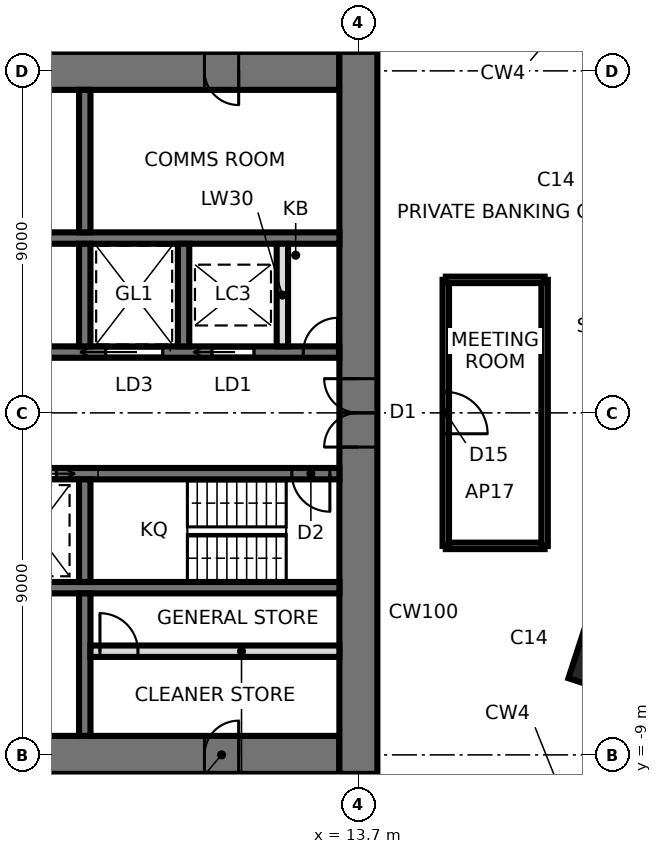
"""IFC4 building model, lengths in metres.
Left out: names, types, materials, properties, quantities, classifications, styles, units other than length and angle.
Written with IfcOpenShell. Run it as: python <this file> out.ifc"""

import sys

from ifc_helpers import new_model, si_unit, direction, frame, frame_2d, origin, origin_2d, place, context, subcontext, project, spatial, rectangle, extrude, element, fill, save


model = new_model("IFC4")
c1 = context("Model", 3, precision=1e-05, world=origin(), true_north=direction((0.0, 1.0)))
c2 = subcontext(c1, "Body", "Model", "MODEL_VIEW")
j1 = project(units=[si_unit("LENGTHUNIT", "METRE"), si_unit("PLANEANGLEUNIT", "RADIAN")], contexts=[c1])
p1 = place(None, origin())
s1 = spatial("IfcSite", under=j1, at=p1, CompositionType="ELEMENT")
p2 = place(p1, origin())
s2 = spatial("IfcBuilding", under=s1, at=p2, CompositionType="ELEMENT")
p3 = place(p2, frame((0.0, 0.0, 187.7)))
s3 = spatial("IfcBuildingStorey", under=s2, at=p3, CompositionType="ELEMENT", Elevation=187.7)
p4 = place(p3, frame((20.109, -6.534, 0.0), z_axis=(0.0, 0.0, 1.0), x_axis=(0.951056516295, -0.309016994375, 0.0)))
e1 = element("IfcColumn", 1, at=p4, inside=s3, PredefinedType="COLUMN", context=c2, shape_type="SweptSolid", body=[
    extrude(rectangle(XDim=1.4, YDim=1.4, at=origin_2d()), origin(), (0.0, 0.0, 1.0), 3.9),
])
p5 = place(p3, frame((-13.2, -9.0, 0.0), z_axis=(0.0, 0.0, 1.0), x_axis=(1.0, 0.0, 0.0)))
e2 = element("IfcWall", 2, at=p5, inside=s3, PredefinedType="SHEAR", context=c2, shape_type="SweptSolid", body=[
    extrude(rectangle(XDim=26.4, YDim=1.0, at=frame_2d((13.2, 0.0))), origin(), (0.0, 0.0, 1.0), 3.9),
])
p6 = place(p5, frame((2.65, 0.0, 0.0)))
e3 = element("IfcOpeningElement", 3, at=p6, cuts=e2, PredefinedType="OPENING", context=c2, shape_type="SweptSolid", body=[
    extrude(rectangle(XDim=0.9, YDim=2.1, at=frame_2d((0.45, 1.05))), frame((0.0, 0.51, 0.0), z_axis=(0.0, -1.0, 0.0), x_axis=(1.0, 0.0, 0.0)), (0.0, 0.0, 1.0), 1.02),
])
p7 = place(p5, frame((9.5, 0.0, 0.0)))
e4 = element("IfcOpeningElement", 4, at=p7, cuts=e2, PredefinedType="OPENING", context=c2, shape_type="SweptSolid", body=[
    extrude(rectangle(XDim=0.9, YDim=2.1, at=frame_2d((0.45, 1.05))), frame((0.0, 0.51, 0.0), z_axis=(0.0, -1.0, 0.0), x_axis=(1.0, 0.0, 0.0)), (0.0, 0.0, 1.0), 1.02),
])
p8 = place(p5, frame((16.0, 0.0, 0.0)))
e5 = element("IfcOpeningElement", 5, at=p8, cuts=e2, PredefinedType="OPENING", context=c2, shape_type="SweptSolid", body=[
    extrude(rectangle(XDim=0.9, YDim=2.1, at=frame_2d((0.45, 1.05))), frame((0.0, 0.51, 0.0), z_axis=(0.0, -1.0, 0.0), x_axis=(1.0, 0.0, 0.0)), (0.0, 0.0, 1.0), 1.02),
])
p9 = place(p5, frame((22.85, 0.0, 0.0)))
e6 = element("IfcOpeningElement", 6, at=p9, cuts=e2, PredefinedType="OPENING", context=c2, shape_type="SweptSolid", body=[
    extrude(rectangle(XDim=0.9, YDim=2.1, at=frame_2d((0.45, 1.05))), frame((0.0, 0.51, 0.0), z_axis=(0.0, -1.0, 0.0), x_axis=(1.0, 0.0, 0.0)), (0.0, 0.0, 1.0), 1.02),
])
p10 = place(p3, frame((13.2, 9.0, 0.0), z_axis=(0.0, 0.0, 1.0), x_axis=(-1.0, 0.0, 0.0)))
e7 = element("IfcWall", 7, at=p10, inside=s3, PredefinedType="SHEAR", context=c2, shape_type="SweptSolid", body=[
    extrude(rectangle(XDim=26.4, YDim=1.0, at=frame_2d((13.2, 0.0))), origin(), (0.0, 0.0, 1.0), 3.9),
])
p11 = place(p10, frame((2.65, 0.0, 0.0)))
e8 = element("IfcOpeningElement", 8, at=p11, cuts=e7, PredefinedType="OPENING", context=c2, shape_type="SweptSolid", body=[
    extrude(rectangle(XDim=0.9, YDim=2.1, at=frame_2d((0.45, 1.05))), frame((0.0, 0.51, 0.0), z_axis=(0.0, -1.0, 0.0), x_axis=(1.0, 0.0, 0.0)), (0.0, 0.0, 1.0), 1.02),
])
p12 = place(p10, frame((9.5, 0.0, 0.0)))
e9 = element("IfcOpeningElement", 9, at=p12, cuts=e7, PredefinedType="OPENING", context=c2, shape_type="SweptSolid", body=[
    extrude(rectangle(XDim=0.9, YDim=2.1, at=frame_2d((0.45, 1.05))), frame((0.0, 0.51, 0.0), z_axis=(0.0, -1.0, 0.0), x_axis=(1.0, 0.0, 0.0)), (0.0, 0.0, 1.0), 1.02),
])
p13 = place(p10, frame((16.0, 0.0, 0.0)))
e10 = element("IfcOpeningElement", 10, at=p13, cuts=e7, PredefinedType="OPENING", context=c2, shape_type="SweptSolid", body=[
    extrude(rectangle(XDim=0.9, YDim=2.1, at=frame_2d((0.45, 1.05))), frame((0.0, 0.51, 0.0), z_axis=(0.0, -1.0, 0.0), x_axis=(1.0, 0.0, 0.0)), (0.0, 0.0, 1.0), 1.02),
])
p14 = place(p10, frame((21.25, 0.0, 0.0)))
e11 = element("IfcOpeningElement", 11, at=p14, cuts=e7, PredefinedType="OPENING", context=c2, shape_type="SweptSolid", body=[
    extrude(rectangle(XDim=0.9, YDim=2.1, at=frame_2d((0.45, 1.05))), frame((0.0, 0.51, 0.0), z_axis=(0.0, -1.0, 0.0), x_axis=(1.0, 0.0, 0.0)), (0.0, 0.0, 1.0), 1.02),
])
p15 = place(p10, frame((24.8, 0.0, 0.0)))
e12 = element("IfcOpeningElement", 12, at=p15, cuts=e7, PredefinedType="OPENING", context=c2, shape_type="SweptSolid", body=[
    extrude(rectangle(XDim=1.0, YDim=2.1, at=frame_2d((0.5, 1.05))), frame((0.0, 0.51, 0.0), z_axis=(0.0, -1.0, 0.0), x_axis=(1.0, 0.0, 0.0)), (0.0, 0.0, 1.0), 1.02),
])
p16 = place(p3, frame((13.7, -9.5, 0.0), z_axis=(0.0, 0.0, 1.0), x_axis=(0.0, 1.0, 0.0)))
e13 = element("IfcWall", 13, at=p16, inside=s3, PredefinedType="SHEAR", context=c2, shape_type="SweptSolid", body=[
    extrude(rectangle(XDim=19.0, YDim=1.0, at=frame_2d((9.5, 0.0))), origin(), (0.0, 0.0, 1.0), 3.9),
])
p17 = place(p16, frame((8.6, 0.0, 0.0)))
e14 = element("IfcOpeningElement", 14, at=p17, cuts=e13, PredefinedType="OPENING", context=c2, shape_type="SweptSolid", body=[
    extrude(rectangle(XDim=1.8, YDim=2.4, at=frame_2d((0.9, 1.2))), frame((0.0, 0.51, 0.0), z_axis=(0.0, -1.0, 0.0), x_axis=(1.0, 0.0, 0.0)), (0.0, 0.0, 1.0), 1.02),
])
p18 = place(p3, frame((-13.2, 1.6, 0.0), z_axis=(0.0, 0.0, 1.0), x_axis=(1.0, 0.0, 0.0)))
e15 = element("IfcWall", 15, at=p18, inside=s3, PredefinedType="SHEAR", context=c2, shape_type="SweptSolid", body=[
    extrude(rectangle(XDim=26.4, YDim=0.3, at=frame_2d((13.2, 0.0))), origin(), (0.0, 0.0, 1.0), 3.9),
])
p19 = place(p18, frame((0.25, 0.0, 0.0)))
e16 = element("IfcOpeningElement", 16, at=p19, cuts=e15, PredefinedType="OPENING", context=c2, shape_type="SweptSolid", body=[
    extrude(rectangle(XDim=1.0, YDim=2.1, at=frame_2d((0.5, 1.05))), frame((0.0, 0.16, 0.0), z_axis=(0.0, -1.0, 0.0), x_axis=(1.0, 0.0, 0.0)), (0.0, 0.0, 1.0), 0.32),
])
p20 = place(p18, frame((23.05, 0.0, 0.0)))
e17 = element("IfcOpeningElement", 17, at=p20, cuts=e15, PredefinedType="OPENING", context=c2, shape_type="SweptSolid", body=[
    extrude(rectangle(XDim=1.1, YDim=2.3, at=frame_2d((0.55, 1.15))), frame((0.0, 0.16, 0.0), z_axis=(0.0, -1.0, 0.0), x_axis=(1.0, 0.0, 0.0)), (0.0, 0.0, 1.0), 0.32),
])
p21 = place(p18, frame((20.25, 0.0, 0.0)))
e18 = element("IfcOpeningElement", 18, at=p21, cuts=e15, PredefinedType="OPENING", context=c2, shape_type="SweptSolid", body=[
    extrude(rectangle(XDim=1.5, YDim=2.4, at=frame_2d((0.75, 1.2))), frame((0.0, 0.16, 0.0), z_axis=(0.0, -1.0, 0.0), x_axis=(1.0, 0.0, 0.0)), (0.0, 0.0, 1.0), 0.32),
])
p22 = place(p18, frame((6.95, 0.0, 0.0)))
e19 = element("IfcOpeningElement", 19, at=p22, cuts=e15, PredefinedType="OPENING", context=c2, shape_type="SweptSolid", body=[
    extrude(rectangle(XDim=0.9, YDim=2.1, at=frame_2d((0.45, 1.05))), frame((0.0, 0.16, 0.0), z_axis=(0.0, -1.0, 0.0), x_axis=(1.0, 0.0, 0.0)), (0.0, 0.0, 1.0), 0.32),
])
p23 = place(p18, frame((9.55, 0.0, 0.0)))
e20 = element("IfcOpeningElement", 20, at=p23, cuts=e15, PredefinedType="OPENING", context=c2, shape_type="SweptSolid", body=[
    extrude(rectangle(XDim=0.9, YDim=2.1, at=frame_2d((0.45, 1.05))), frame((0.0, 0.16, 0.0), z_axis=(0.0, -1.0, 0.0), x_axis=(1.0, 0.0, 0.0)), (0.0, 0.0, 1.0), 0.32),
])
p24 = place(p18, frame((12.15, 0.0, 0.0)))
e21 = element("IfcOpeningElement", 21, at=p24, cuts=e15, PredefinedType="OPENING", context=c2, shape_type="SweptSolid", body=[
    extrude(rectangle(XDim=0.9, YDim=2.1, at=frame_2d((0.45, 1.05))), frame((0.0, 0.16, 0.0), z_axis=(0.0, -1.0, 0.0), x_axis=(1.0, 0.0, 0.0)), (0.0, 0.0, 1.0), 0.32),
])
p25 = place(p18, frame((25.45, 0.0, 0.0)))
e22 = element("IfcOpeningElement", 22, at=p25, cuts=e15, PredefinedType="OPENING", context=c2, shape_type="SweptSolid", body=[
    extrude(rectangle(XDim=0.9, YDim=2.1, at=frame_2d((0.45, 1.05))), frame((0.0, 0.16, 0.0), z_axis=(0.0, -1.0, 0.0), x_axis=(1.0, 0.0, 0.0)), (0.0, 0.0, 1.0), 0.32),
])
p26 = place(p3, frame((-13.2, -1.6, 0.0), z_axis=(0.0, 0.0, 1.0), x_axis=(1.0, 0.0, 0.0)))
e23 = element("IfcWall", 23, at=p26, inside=s3, PredefinedType="SHEAR", context=c2, shape_type="SweptSolid", body=[
    extrude(rectangle(XDim=26.4, YDim=0.3, at=frame_2d((13.2, 0.0))), origin(), (0.0, 0.0, 1.0), 3.9),
])
p27 = place(p26, frame((25.15, 0.0, 0.0)))
e24 = element("IfcOpeningElement", 24, at=p27, cuts=e23, PredefinedType="OPENING", context=c2, shape_type="SweptSolid", body=[
    extrude(rectangle(XDim=1.0, YDim=2.1, at=frame_2d((0.5, 1.05))), frame((0.0, 0.16, 0.0), z_axis=(0.0, -1.0, 0.0), x_axis=(1.0, 0.0, 0.0)), (0.0, 0.0, 1.0), 0.32),
])
p28 = place(p26, frame((7.55, 0.0, 0.0)))
e25 = element("IfcOpeningElement", 25, at=p28, cuts=e23, PredefinedType="OPENING", context=c2, shape_type="SweptSolid", body=[
    extrude(rectangle(XDim=0.9, YDim=2.1, at=frame_2d((0.45, 1.05))), frame((0.0, 0.16, 0.0), z_axis=(0.0, -1.0, 0.0), x_axis=(1.0, 0.0, 0.0)), (0.0, 0.0, 1.0), 0.32),
])
p29 = place(p26, frame((9.55, 0.0, 0.0)))
e26 = element("IfcOpeningElement", 26, at=p29, cuts=e23, PredefinedType="OPENING", context=c2, shape_type="SweptSolid", body=[
    extrude(rectangle(XDim=0.9, YDim=2.1, at=frame_2d((0.45, 1.05))), frame((0.0, 0.16, 0.0), z_axis=(0.0, -1.0, 0.0), x_axis=(1.0, 0.0, 0.0)), (0.0, 0.0, 1.0), 0.32),
])
p30 = place(p26, frame((12.15, 0.0, 0.0)))
e27 = element("IfcOpeningElement", 27, at=p30, cuts=e23, PredefinedType="OPENING", context=c2, shape_type="SweptSolid", body=[
    extrude(rectangle(XDim=0.9, YDim=2.1, at=frame_2d((0.45, 1.05))), frame((0.0, 0.16, 0.0), z_axis=(0.0, -1.0, 0.0), x_axis=(1.0, 0.0, 0.0)), (0.0, 0.0, 1.0), 0.32),
])
p31 = place(p26, frame((15.25, 0.0, 0.0)))
e28 = element("IfcOpeningElement", 28, at=p31, cuts=e23, PredefinedType="OPENING", context=c2, shape_type="SweptSolid", body=[
    extrude(rectangle(XDim=1.1, YDim=2.3, at=frame_2d((0.55, 1.15))), frame((0.0, 0.16, 0.0), z_axis=(0.0, -1.0, 0.0), x_axis=(1.0, 0.0, 0.0)), (0.0, 0.0, 1.0), 0.32),
])
p32 = place(p26, frame((17.85, 0.0, 0.0)))
e29 = element("IfcOpeningElement", 29, at=p32, cuts=e23, PredefinedType="OPENING", context=c2, shape_type="SweptSolid", body=[
    extrude(rectangle(XDim=1.1, YDim=2.3, at=frame_2d((0.55, 1.15))), frame((0.0, 0.16, 0.0), z_axis=(0.0, -1.0, 0.0), x_axis=(1.0, 0.0, 0.0)), (0.0, 0.0, 1.0), 0.32),
])
p33 = place(p26, frame((4.85, 0.0, 0.0)))
e30 = element("IfcOpeningElement", 30, at=p33, cuts=e23, PredefinedType="OPENING", context=c2, shape_type="SweptSolid", body=[
    extrude(rectangle(XDim=1.1, YDim=2.3, at=frame_2d((0.55, 1.15))), frame((0.0, 0.16, 0.0), z_axis=(0.0, -1.0, 0.0), x_axis=(1.0, 0.0, 0.0)), (0.0, 0.0, 1.0), 0.32),
])
p34 = place(p26, frame((2.25, 0.0, 0.0)))
e31 = element("IfcOpeningElement", 31, at=p34, cuts=e23, PredefinedType="OPENING", context=c2, shape_type="SweptSolid", body=[
    extrude(rectangle(XDim=1.1, YDim=2.3, at=frame_2d((0.55, 1.15))), frame((0.0, 0.16, 0.0), z_axis=(0.0, -1.0, 0.0), x_axis=(1.0, 0.0, 0.0)), (0.0, 0.0, 1.0), 0.32),
])
p35 = place(p26, frame((0.35, 0.0, 0.0)))
e32 = element("IfcOpeningElement", 32, at=p35, cuts=e23, PredefinedType="OPENING", context=c2, shape_type="SweptSolid", body=[
    extrude(rectangle(XDim=0.9, YDim=2.1, at=frame_2d((0.45, 1.05))), frame((0.0, 0.16, 0.0), z_axis=(0.0, -1.0, 0.0), x_axis=(1.0, 0.0, 0.0)), (0.0, 0.0, 1.0), 0.32),
])
for number, where, z_axis, x_axis in (
    (33, (-13.2, 4.6, 0.0), (0.0, 0.0, 1.0), (1.0, 0.0, 0.0)),
    (34, (-13.2, -4.6, 0.0), (0.0, 0.0, 1.0), (1.0, 0.0, 0.0)),
):
    element("IfcWall", number, at=place(p3, frame(where, z_axis=z_axis, x_axis=x_axis)), inside=s3, PredefinedType="SHEAR", context=c2, shape_type="SweptSolid", body=[
        extrude(rectangle(XDim=26.4, YDim=0.3, at=frame_2d((13.2, 0.0))), origin(), (0.0, 0.0, 1.0), 3.9),
    ])
p36 = place(p3, frame((6.5, 1.75, 0.0), z_axis=(0.0, 0.0, 1.0), x_axis=(0.0, 1.0, 0.0)))
e35 = element("IfcWall", 35, at=p36, inside=s3, PredefinedType="SHEAR", context=c2, shape_type="SweptSolid", body=[
    extrude(rectangle(XDim=2.7, YDim=0.3, at=frame_2d((1.35, 0.0))), origin(), (0.0, 0.0, 1.0), 3.9),
])
p37 = place(p3, frame((6.5, 4.75, 0.0), z_axis=(0.0, 0.0, 1.0), x_axis=(0.0, 1.0, 0.0)))
e36 = element("IfcWall", 36, at=p37, inside=s3, PredefinedType="SHEAR", context=c2, shape_type="SweptSolid", body=[
    extrude(rectangle(XDim=3.75, YDim=0.3, at=frame_2d((1.875, 0.0))), origin(), (0.0, 0.0, 1.0), 3.9),
])
p38 = place(p3, frame((6.5, -1.75, 0.0), z_axis=(0.0, 0.0, 1.0), x_axis=(0.0, -1.0, 0.0)))
e37 = element("IfcWall", 37, at=p38, inside=s3, PredefinedType="SHEAR", context=c2, shape_type="SweptSolid", body=[
    extrude(rectangle(XDim=2.7, YDim=0.3, at=frame_2d((1.35, 0.0))), origin(), (0.0, 0.0, 1.0), 3.9),
])
p39 = place(p3, frame((6.5, -4.75, 0.0), z_axis=(0.0, 0.0, 1.0), x_axis=(0.0, -1.0, 0.0)))
e38 = element("IfcWall", 38, at=p39, inside=s3, PredefinedType="SHEAR", context=c2, shape_type="SweptSolid", body=[
    extrude(rectangle(XDim=3.75, YDim=0.3, at=frame_2d((1.875, 0.0))), origin(), (0.0, 0.0, 1.0), 3.9),
])
p40 = place(p3, frame((9.1, 1.75, 0.0), z_axis=(0.0, 0.0, 1.0), x_axis=(0.0, 1.0, 0.0)))
e39 = element("IfcWall", 39, at=p40, inside=s3, PredefinedType="SHEAR", context=c2, shape_type="SweptSolid", body=[
    extrude(rectangle(XDim=2.7, YDim=0.3, at=frame_2d((1.35, 0.0))), origin(), (0.0, 0.0, 1.0), 3.9),
])
p41 = place(p3, frame((6.65, -6.272, 0.0), z_axis=(0.0, 0.0, 1.0), x_axis=(1.0, 0.0, 0.0)))
e40 = element("IfcWall", 40, at=p41, inside=s3, PredefinedType="PARTITIONING", context=c2, shape_type="SweptSolid", body=[
    extrude(rectangle(XDim=6.55, YDim=0.3, at=frame_2d((3.275, 0.0))), origin(), (0.0, 0.0, 1.0), 3.74),
])
p42 = place(p41, frame((0.25, 0.0, 0.0)))
e41 = element("IfcOpeningElement", 41, at=p42, cuts=e40, PredefinedType="OPENING", context=c2, shape_type="SweptSolid", body=[
    extrude(rectangle(XDim=1.0, YDim=2.4, at=frame_2d((0.5, 1.2))), frame((0.0, 0.16, 0.0), z_axis=(0.0, -1.0, 0.0), x_axis=(1.0, 0.0, 0.0)), (0.0, 0.0, 1.0), 0.32),
])
p43 = place(p3, frame((11.7, 1.75, 0.0), z_axis=(0.0, 0.0, 1.0), x_axis=(0.0, 1.0, 0.0)))
e42 = element("IfcWall", 42, at=p43, inside=s3, PredefinedType="SOLIDWALL", context=c2, shape_type="SweptSolid", body=[
    extrude(rectangle(XDim=2.7, YDim=0.3, at=frame_2d((1.35, 0.0))), origin(), (0.0, 0.0, 1.0), 3.74),
])
p44 = place(p3, frame((18.6, -3.5, 0.0), z_axis=(0.0, 0.0, 1.0), x_axis=(-1.0, 0.0, 0.0)))
e43 = element("IfcWall", 43, at=p44, inside=s3, PredefinedType="PARTITIONING", context=c2, shape_type="SweptSolid", body=[
    extrude(rectangle(XDim=2.6, YDim=0.17, at=frame_2d((1.3, 0.0))), origin(), (0.0, 0.0, 1.0), 3.74),
])
p45 = place(p3, frame((16.0, -3.5, 0.0), z_axis=(0.0, 0.0, 1.0), x_axis=(0.0, 1.0, 0.0)))
e44 = element("IfcWall", 44, at=p45, inside=s3, PredefinedType="PARTITIONING", context=c2, shape_type="SweptSolid", body=[
    extrude(rectangle(XDim=7.0, YDim=0.17, at=frame_2d((3.5, 0.0))), origin(), (0.0, 0.0, 1.0), 3.74),
])
p46 = place(p45, frame((2.95, 0.0, 0.0)))
e45 = element("IfcOpeningElement", 45, at=p46, cuts=e44, PredefinedType="OPENING", context=c2, shape_type="SweptSolid", body=[
    extrude(rectangle(XDim=1.1, YDim=2.4, at=frame_2d((0.55, 1.2))), frame((0.0, 0.095, 0.0), z_axis=(0.0, -1.0, 0.0), x_axis=(1.0, 0.0, 0.0)), (0.0, 0.0, 1.0), 0.19),
])
p47 = place(p3, frame((18.6, 3.5, 0.0), z_axis=(0.0, 0.0, 1.0), x_axis=(0.0, -1.0, 0.0)))
e46 = element("IfcWall", 46, at=p47, inside=s3, PredefinedType="PARTITIONING", context=c2, shape_type="SweptSolid", body=[
    extrude(rectangle(XDim=7.0, YDim=0.17, at=frame_2d((3.5, 0.0))), origin(), (0.0, 0.0, 1.0), 3.334),
])
p48 = place(p3, frame((16.0, 3.5, 0.0), z_axis=(0.0, 0.0, 1.0), x_axis=(1.0, 0.0, 0.0)))
e47 = element("IfcWall", 47, at=p48, inside=s3, PredefinedType="PARTITIONING", context=c2, shape_type="SweptSolid", body=[
    extrude(rectangle(XDim=2.6, YDim=0.17, at=frame_2d((1.3, 0.0))), origin(), (0.0, 0.0, 1.0), 3.74),
])
p49 = place(p17, origin())
e48 = element("IfcDoor", 48, at=p49, inside=s3, OperationType="DOUBLE_DOOR_SINGLE_SWING", PredefinedType="DOOR", context=c2, shape_type="SweptSolid", body=[
    extrude(rectangle(XDim=1.72, YDim=2.36, at=frame_2d((0.9, 1.18))), frame((0.0, 0.025, 0.0), z_axis=(0.0, -1.0, 0.0), x_axis=(1.0, 0.0, 0.0)), (0.0, 0.0, 1.0), 0.05),
    extrude(rectangle(XDim=0.04, YDim=2.4, at=frame_2d((0.02, 1.2))), frame((0.0, 0.25, 0.0), z_axis=(0.0, -1.0, 0.0), x_axis=(1.0, 0.0, 0.0)), (0.0, 0.0, 1.0), 0.5),
    extrude(rectangle(XDim=0.04, YDim=2.4, at=frame_2d((1.78, 1.2))), frame((0.0, 0.25, 0.0), z_axis=(0.0, -1.0, 0.0), x_axis=(1.0, 0.0, 0.0)), (0.0, 0.0, 1.0), 0.5),
    extrude(rectangle(XDim=1.72, YDim=0.04, at=frame_2d((0.9, 2.38))), frame((0.0, 0.25, 0.0), z_axis=(0.0, -1.0, 0.0), x_axis=(1.0, 0.0, 0.0)), (0.0, 0.0, 1.0), 0.5),
])
fill(e14, e48)
p50 = place(p27, frame((1.0, 0.0, 0.0), z_axis=(0.0, 0.0, 1.0), x_axis=(-1.0, 0.0, 0.0)))
e49 = element("IfcDoor", 49, at=p50, inside=s3, OperationType="SINGLE_SWING_LEFT", PredefinedType="DOOR", context=c2, shape_type="SweptSolid", body=[
    extrude(rectangle(XDim=1.0, YDim=2.1, at=frame_2d((0.5, 1.05))), frame((0.0, 0.025, 0.0), z_axis=(0.0, -1.0, 0.0), x_axis=(1.0, 0.0, 0.0)), (0.0, 0.0, 1.0), 0.05),
])
fill(e24, e49)
p51 = place(p20, origin())
e50 = element("IfcDoor", 50, at=p51, inside=s3, OperationType="SLIDING_TO_LEFT", PredefinedType="DOOR", context=c2, shape_type="SweptSolid", body=[
    extrude(rectangle(XDim=1.1, YDim=2.3, at=frame_2d((0.55, 1.15))), frame((0.0, 0.025, 0.0), z_axis=(0.0, -1.0, 0.0), x_axis=(1.0, 0.0, 0.0)), (0.0, 0.0, 1.0), 0.05),
])
fill(e17, e50)
p52 = place(p21, origin())
e51 = element("IfcDoor", 51, at=p52, inside=s3, OperationType="SLIDING_TO_LEFT", PredefinedType="DOOR", context=c2, shape_type="SweptSolid", body=[
    extrude(rectangle(XDim=1.5, YDim=2.4, at=frame_2d((0.75, 1.2))), frame((0.0, 0.025, 0.0), z_axis=(0.0, -1.0, 0.0), x_axis=(1.0, 0.0, 0.0)), (0.0, 0.0, 1.0), 0.05),
])
fill(e18, e51)
p53 = place(p32, frame((1.1, 0.0, 0.0), z_axis=(0.0, 0.0, 1.0), x_axis=(-1.0, 0.0, 0.0)))
e52 = element("IfcDoor", 52, at=p53, inside=s3, OperationType="SLIDING_TO_LEFT", PredefinedType="DOOR", context=c2, shape_type="SweptSolid", body=[
    extrude(rectangle(XDim=1.1, YDim=2.3, at=frame_2d((0.55, 1.15))), frame((0.0, 0.025, 0.0), z_axis=(0.0, -1.0, 0.0), x_axis=(1.0, 0.0, 0.0)), (0.0, 0.0, 1.0), 0.05),
])
fill(e29, e52)
p54 = place(p25, origin())
e53 = element("IfcDoor", 53, at=p54, inside=s3, OperationType="SINGLE_SWING_RIGHT", PredefinedType="DOOR", context=c2, shape_type="SweptSolid", body=[
    extrude(rectangle(XDim=0.9, YDim=2.1, at=frame_2d((0.45, 1.05))), frame((0.0, 0.025, 0.0), z_axis=(0.0, -1.0, 0.0), x_axis=(1.0, 0.0, 0.0)), (0.0, 0.0, 1.0), 0.05),
])
fill(e22, e53)
p55 = place(p11, origin())
e54 = element("IfcDoor", 54, at=p55, inside=s3, OperationType="SINGLE_SWING_LEFT", PredefinedType="DOOR", context=c2, shape_type="SweptSolid", body=[
    extrude(rectangle(XDim=0.82, YDim=2.06, at=frame_2d((0.45, 1.03))), frame((0.0, 0.025, 0.0), z_axis=(0.0, -1.0, 0.0), x_axis=(1.0, 0.0, 0.0)), (0.0, 0.0, 1.0), 0.05),
    extrude(rectangle(XDim=0.04, YDim=2.1, at=frame_2d((0.02, 1.05))), frame((0.0, 0.25, 0.0), z_axis=(0.0, -1.0, 0.0), x_axis=(1.0, 0.0, 0.0)), (0.0, 0.0, 1.0), 0.5),
    extrude(rectangle(XDim=0.04, YDim=2.1, at=frame_2d((0.88, 1.05))), frame((0.0, 0.25, 0.0), z_axis=(0.0, -1.0, 0.0), x_axis=(1.0, 0.0, 0.0)), (0.0, 0.0, 1.0), 0.5),
    extrude(rectangle(XDim=0.82, YDim=0.04, at=frame_2d((0.45, 2.08))), frame((0.0, 0.25, 0.0), z_axis=(0.0, -1.0, 0.0), x_axis=(1.0, 0.0, 0.0)), (0.0, 0.0, 1.0), 0.5),
])
fill(e8, e54)
p56 = place(p9, origin())
e55 = element("IfcDoor", 55, at=p56, inside=s3, OperationType="SINGLE_SWING_RIGHT", PredefinedType="DOOR", context=c2, shape_type="SweptSolid", body=[
    extrude(rectangle(XDim=0.82, YDim=2.06, at=frame_2d((0.45, 1.03))), frame((0.0, 0.025, 0.0), z_axis=(0.0, -1.0, 0.0), x_axis=(1.0, 0.0, 0.0)), (0.0, 0.0, 1.0), 0.05),
    extrude(rectangle(XDim=0.04, YDim=2.1, at=frame_2d((0.02, 1.05))), frame((0.0, 0.25, 0.0), z_axis=(0.0, -1.0, 0.0), x_axis=(1.0, 0.0, 0.0)), (0.0, 0.0, 1.0), 0.5),
    extrude(rectangle(XDim=0.04, YDim=2.1, at=frame_2d((0.88, 1.05))), frame((0.0, 0.25, 0.0), z_axis=(0.0, -1.0, 0.0), x_axis=(1.0, 0.0, 0.0)), (0.0, 0.0, 1.0), 0.5),
    extrude(rectangle(XDim=0.82, YDim=0.04, at=frame_2d((0.45, 2.08))), frame((0.0, 0.25, 0.0), z_axis=(0.0, -1.0, 0.0), x_axis=(1.0, 0.0, 0.0)), (0.0, 0.0, 1.0), 0.5),
])
fill(e6, e55)
p57 = place(p42, origin())
e56 = element("IfcDoor", 56, at=p57, inside=s3, OperationType="SINGLE_SWING_LEFT", PredefinedType="DOOR", context=c2, shape_type="SweptSolid", body=[
    extrude(rectangle(XDim=1.0, YDim=2.4, at=frame_2d((0.5, 1.2))), frame((0.0, 0.025, 0.0), z_axis=(0.0, -1.0, 0.0), x_axis=(1.0, 0.0, 0.0)), (0.0, 0.0, 1.0), 0.05),
])
fill(e41, e56)
p58 = place(p46, frame((1.1, 0.0, 0.0), z_axis=(0.0, 0.0, 1.0), x_axis=(-1.0, 0.0, 0.0)))
e57 = element("IfcDoor", 57, at=p58, inside=s3, OperationType="SINGLE_SWING_RIGHT", PredefinedType="DOOR", context=c2, shape_type="SweptSolid", body=[
    extrude(rectangle(XDim=1.1, YDim=2.4, at=frame_2d((0.55, 1.2))), frame((0.0, 0.025, 0.0), z_axis=(0.0, -1.0, 0.0), x_axis=(1.0, 0.0, 0.0)), (0.0, 0.0, 1.0), 0.05),
])
fill(e45, e57)
save(model, sys.argv[1])
